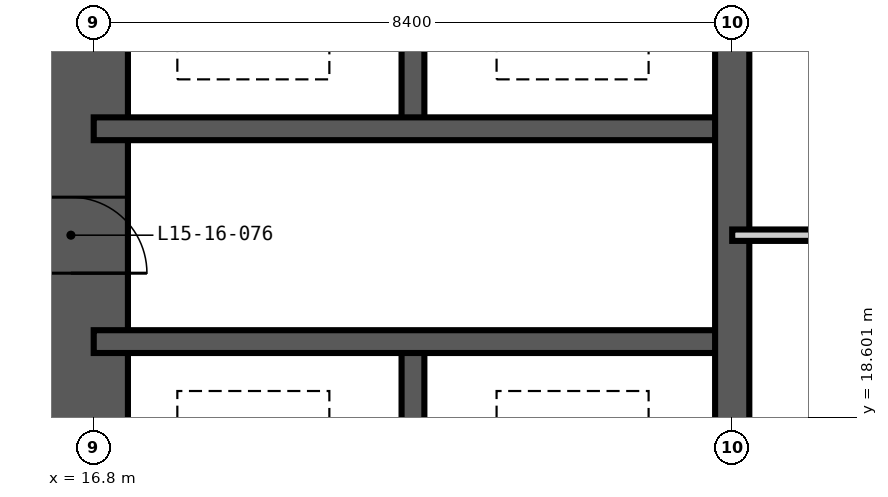
"""IFC4 building model, lengths in metres.
Left out: names, types, materials, properties, quantities, classifications, styles, units other than length and angle.
Written with IfcOpenShell. Run it as: python <this file> out.ifc"""

import sys

from ifc_helpers import new_model, si_unit, direction, frame, frame_2d, origin, place, context, subcontext, project, spatial, rectangle, extrude, element, fill, save


model = new_model("IFC4")
c1 = context("Model", 3, precision=1e-05, world=origin(), true_north=direction((0.0, 1.0)))
c2 = subcontext(c1, "Body", "Model", "MODEL_VIEW")
j1 = project(units=[si_unit("LENGTHUNIT", "METRE"), si_unit("PLANEANGLEUNIT", "RADIAN")], contexts=[c1])
p1 = place(None, origin())
s1 = spatial("IfcSite", under=j1, at=p1, CompositionType="ELEMENT")
p2 = place(p1, origin())
s2 = spatial("IfcBuilding", under=s1, at=p2, CompositionType="ELEMENT")
p3 = place(p2, frame((0.0, 0.0, 63.0)))
s3 = spatial("IfcBuildingStorey", under=s2, at=p3, CompositionType="ELEMENT", Elevation=63.0)
p4 = place(p3, frame((16.5, 41.55, -0.35), z_axis=(0.0, 0.0, 1.0), x_axis=(0.0, -1.0, 0.0)))
e1 = element("IfcWall", 1, at=p4, inside=s3, PredefinedType="SHEAR", context=c2, shape_type="SweptSolid", body=[
    extrude(rectangle(XDim=24.3, YDim=1.5, at=frame_2d((12.15, 0.0))), origin(), (0.0, 0.0, 1.0), 3.6),
])
p5 = place(p4, frame((11.25, 0.0, 0.35)))
e2 = element("IfcOpeningElement", 2, at=p5, cuts=e1, PredefinedType="OPENING", context=c2, shape_type="SweptSolid", body=[
    extrude(rectangle(XDim=1.8, YDim=2.2, at=frame_2d((0.9, 1.1))), frame((0.0, 0.76, 0.0), z_axis=(0.0, -1.0, 0.0), x_axis=(1.0, 0.0, 0.0)), (0.0, 0.0, 1.0), 1.52),
])
p6 = place(p4, frame((20.05, 0.0, 0.35)))
e3 = element("IfcOpeningElement", 3, at=p6, cuts=e1, PredefinedType="OPENING", context=c2, shape_type="SweptSolid", body=[
    extrude(rectangle(XDim=1.0, YDim=2.1, at=frame_2d((0.5, 1.05))), frame((0.0, 0.76, 0.0), z_axis=(0.0, -1.0, 0.0), x_axis=(1.0, 0.0, 0.0)), (0.0, 0.0, 1.0), 1.52),
])
p7 = place(p4, frame((5.35, 0.0, 0.35)))
e4 = element("IfcOpeningElement", 4, at=p7, cuts=e1, PredefinedType="OPENING", context=c2, shape_type="SweptSolid", body=[
    extrude(rectangle(XDim=1.0, YDim=2.1, at=frame_2d((0.5, 1.05))), frame((0.0, 0.76, 0.0), z_axis=(0.0, -1.0, 0.0), x_axis=(1.0, 0.0, 0.0)), (0.0, 0.0, 1.0), 1.52),
])
for number, where, z_axis, x_axis in (
    (5, (21.0, 16.8, -0.35), (0.0, 0.0, 1.0), (0.0, 1.0, 0.0)),
    (6, (21.0, 22.4, -0.35), (0.0, 0.0, 1.0), (0.0, 1.0, 0.0)),
):
    element("IfcWall", number, at=place(p3, frame(where, z_axis=z_axis, x_axis=x_axis)), inside=s3, PredefinedType="SHEAR", context=c2, shape_type="SweptSolid", body=[
        extrude(rectangle(XDim=2.8, YDim=0.3, at=frame_2d((1.4, 0.0))), origin(), (0.0, 0.0, 1.0), 3.6),
    ])
for number, where, z_axis, x_axis in (
    (7, (16.8, 19.6, -0.35), (0.0, 0.0, 1.0), (1.0, 0.0, 0.0)),
    (8, (16.8, 22.4, -0.35), (0.0, 0.0, 1.0), (1.0, 0.0, 0.0)),
):
    element("IfcWall", number, at=place(p3, frame(where, z_axis=z_axis, x_axis=x_axis)), inside=s3, PredefinedType="SHEAR", context=c2, shape_type="SweptSolid", body=[
        extrude(rectangle(XDim=8.4, YDim=0.3, at=frame_2d((4.2, 0.0))), origin(), (0.0, 0.0, 1.0), 3.6),
    ])
p8 = place(p3, frame((25.2, 16.8, -0.35), z_axis=(0.0, 0.0, 1.0), x_axis=(0.0, 1.0, 0.0)))
e9 = element("IfcWall", 9, at=p8, inside=s3, PredefinedType="SHEAR", context=c2, shape_type="SweptSolid", body=[
    extrude(rectangle(XDim=25.2, YDim=0.45, at=frame_2d((12.6, 0.0))), origin(), (0.0, 0.0, 1.0), 3.6),
])
p9 = place(p3, frame((25.2, 21.0, 0.0), z_axis=(0.0, 0.0, 1.0), x_axis=(1.0, 0.0, 0.0)))
e10 = element("IfcWall", 10, at=p9, inside=s3, PredefinedType="PARTITIONING", context=c2, shape_type="SweptSolid", body=[
    extrude(rectangle(XDim=8.4, YDim=0.15, at=frame_2d((4.2, 0.0))), origin(), (0.0, 0.0, 1.0), 3.25),
])
p10 = place(p9, frame((3.7, 0.0, 0.0)))
e11 = element("IfcOpeningElement", 11, at=p10, cuts=e10, PredefinedType="OPENING", context=c2, shape_type="SweptSolid", body=[
    extrude(rectangle(XDim=1.0, YDim=2.1, at=frame_2d((0.5, 1.05))), frame((0.0, 0.085, 0.0), z_axis=(0.0, -1.0, 0.0), x_axis=(1.0, 0.0, 0.0)), (0.0, 0.0, 1.0), 0.17),
])
p11 = place(p6, origin())
e12 = element("IfcDoor", 12, at=p11, inside=s3, OperationType="SINGLE_SWING_RIGHT", PredefinedType="DOOR", context=c2, shape_type="SweptSolid", body=[
    extrude(rectangle(XDim=1.0, YDim=2.1, at=frame_2d((0.5, 1.05))), frame((0.0, 0.025, 0.0), z_axis=(0.0, -1.0, 0.0), x_axis=(1.0, 0.0, 0.0)), (0.0, 0.0, 1.0), 0.05),
])
fill(e3, e12)
save(model, sys.argv[1])
